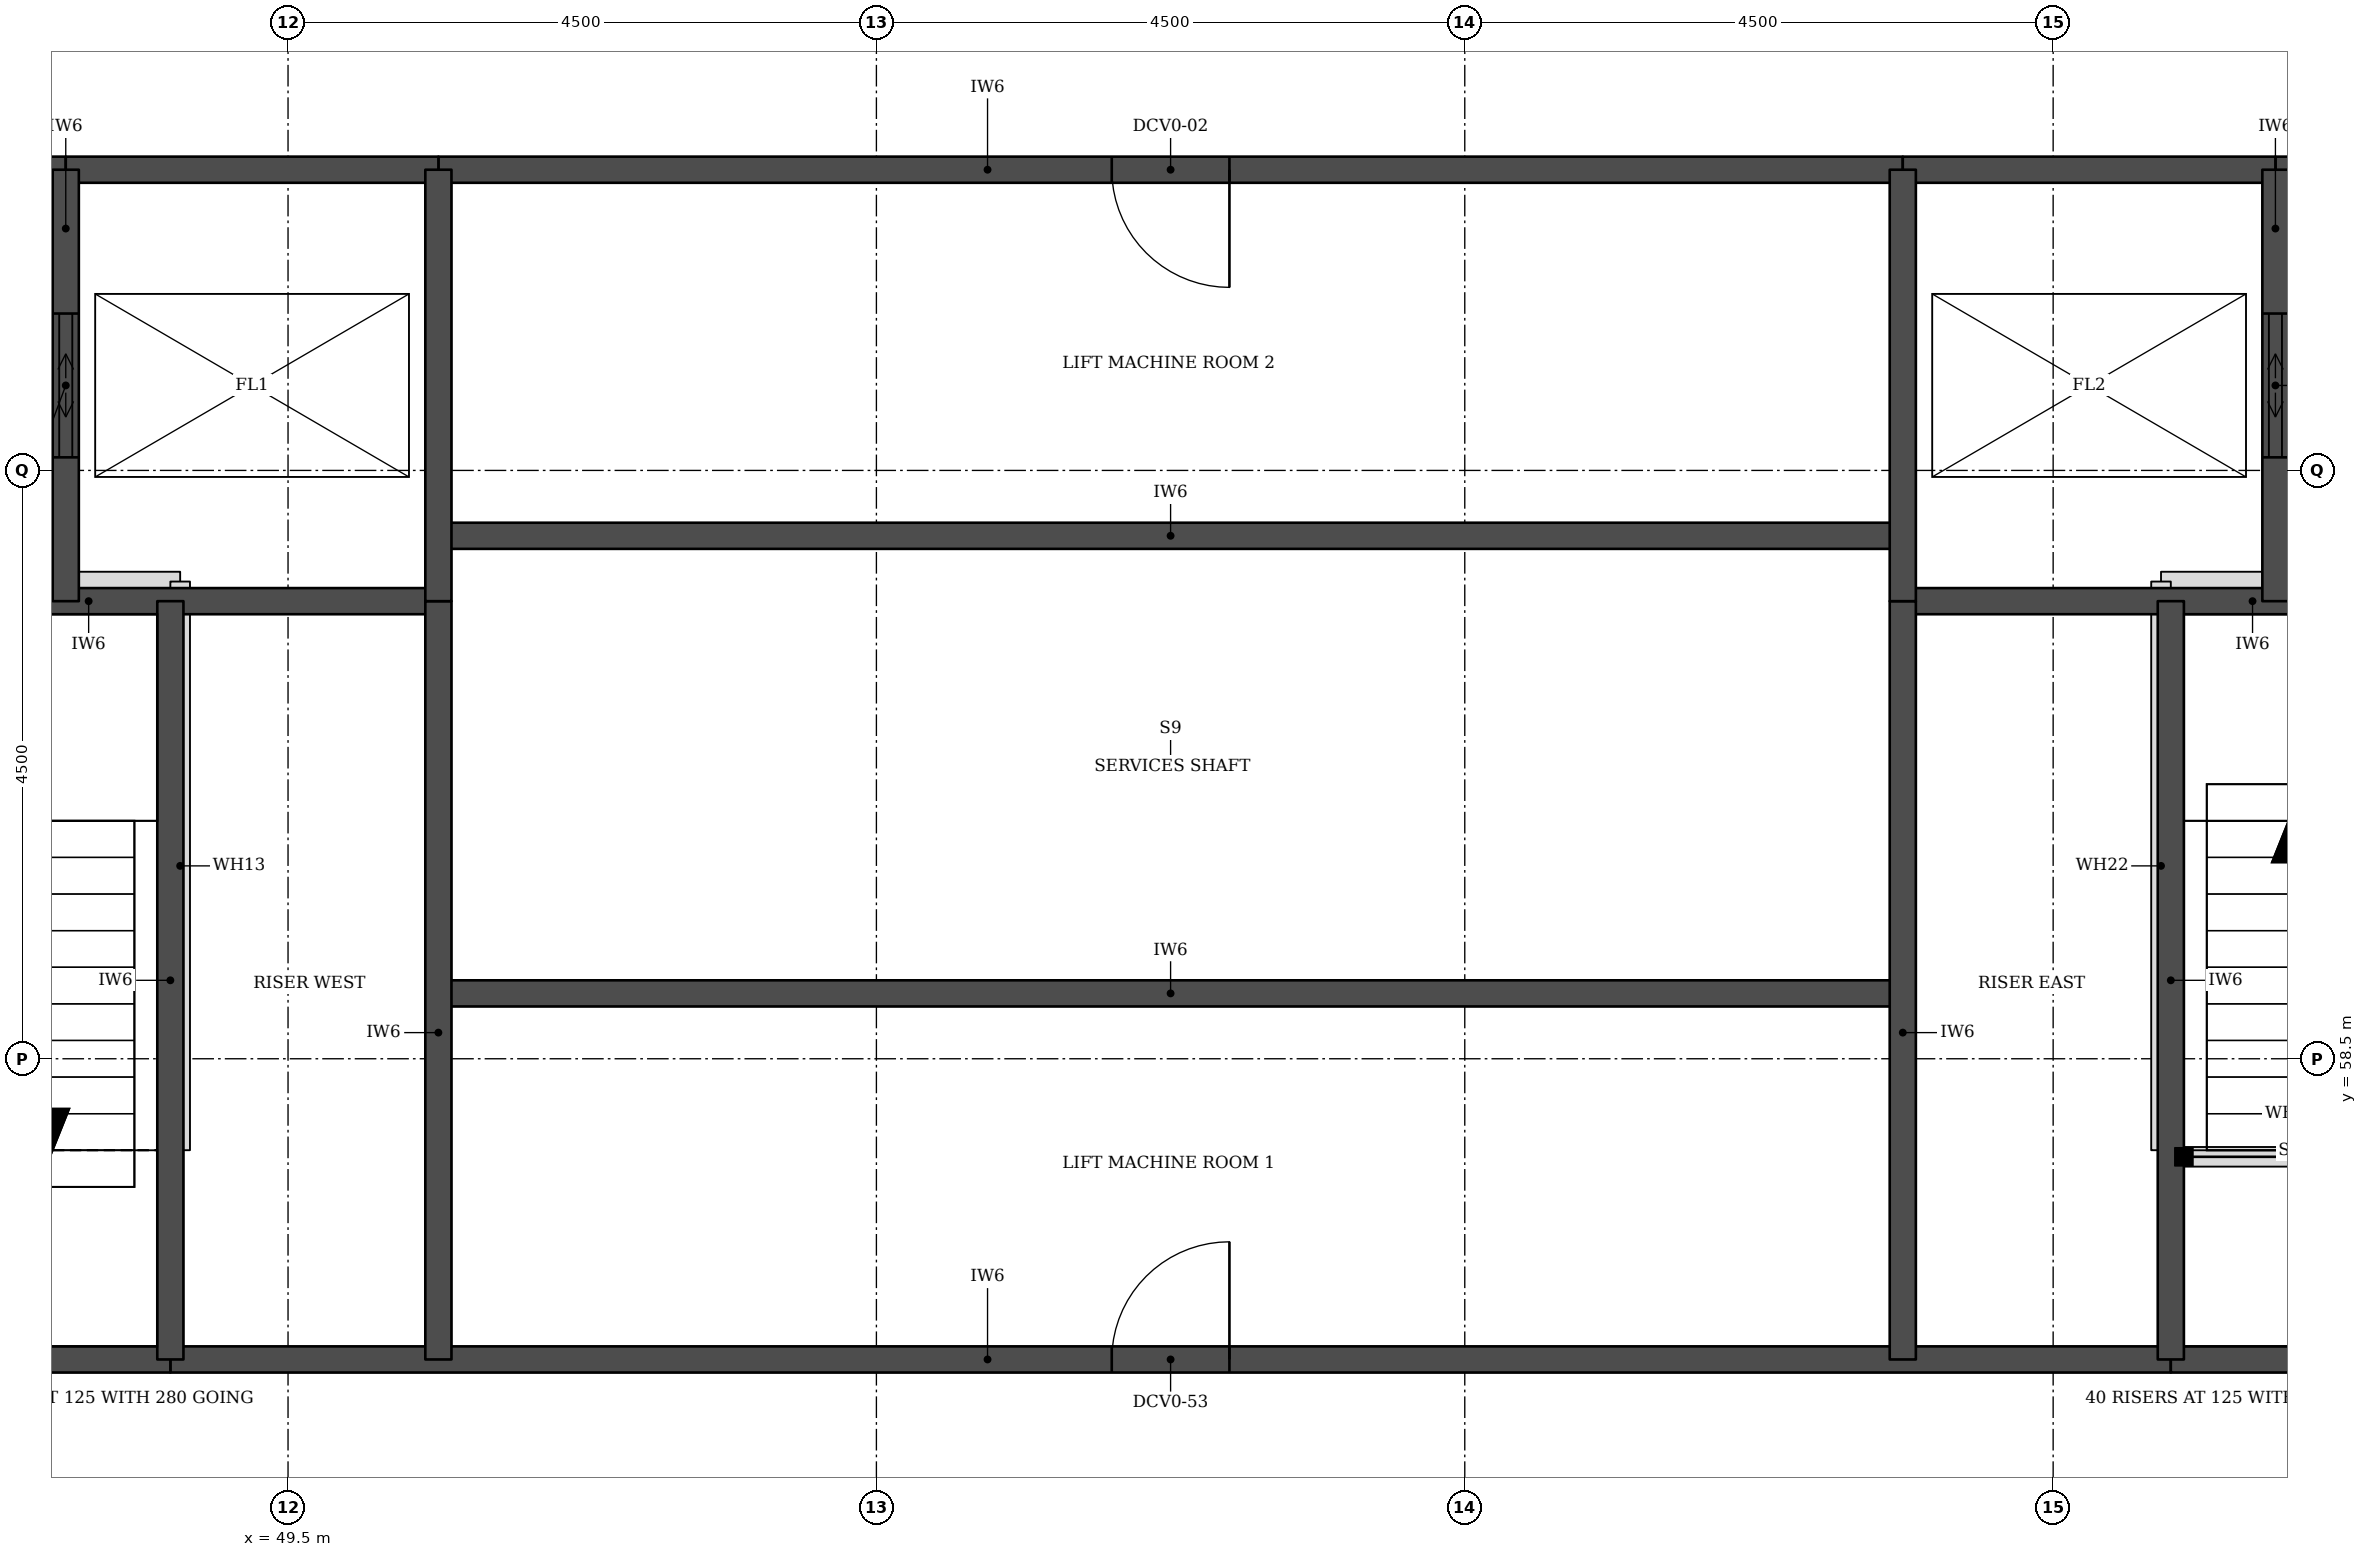
"""IFC4 building model, lengths in metres.
Left out: names, types, materials, properties, quantities, classifications, styles, units other than length and angle.
Written with IfcOpenShell. Run it as: python <this file> out.ifc"""

import sys

from ifc_helpers import new_model, si_unit, direction, frame, frame_2d, origin, place, context, subcontext, project, spatial, rectangle, extrude, element, fill, save


model = new_model("IFC4")
c1 = context("Model", 3, precision=1e-05, world=origin(), true_north=direction((0.0, 1.0)))
c2 = subcontext(c1, "Body", "Model", "MODEL_VIEW")
j1 = project(units=[si_unit("LENGTHUNIT", "METRE"), si_unit("PLANEANGLEUNIT", "RADIAN")], contexts=[c1])
p1 = place(None, origin())
s1 = spatial("IfcSite", under=j1, at=p1, CompositionType="ELEMENT")
p2 = place(p1, origin())
s2 = spatial("IfcBuilding", under=s1, at=p2, CompositionType="ELEMENT")
p3 = place(p2, frame((0.0, 0.0, 268.7)))
s3 = spatial("IfcBuildingStorey", under=s2, at=p3, CompositionType="ELEMENT", Elevation=268.7)
p4 = place(p3, frame((48.6, 56.2, 0.0), z_axis=(0.0, 0.0, 1.0), x_axis=(1.0, 0.0, 0.0)))
e1 = element("IfcWall", 1, at=p4, inside=s3, PredefinedType="SOLIDWALL", context=c2, shape_type="SweptSolid", body=[
    extrude(rectangle(XDim=15.3, YDim=0.2, at=frame_2d((7.65, 0.0))), origin(), (0.0, 0.0, 1.0), 4.75),
])
p5 = place(p4, frame((7.2, 0.0, 0.0)))
e2 = element("IfcOpeningElement", 2, at=p5, cuts=e1, PredefinedType="OPENING", context=c2, shape_type="SweptSolid", body=[
    extrude(rectangle(XDim=0.9, YDim=2.1, at=frame_2d((0.45, 1.05))), frame((0.0, 0.11, 0.0), z_axis=(0.0, -1.0, 0.0), x_axis=(1.0, 0.0, 0.0)), (0.0, 0.0, 1.0), 0.22),
])
for number, where, z_axis, x_axis in (
    (3, (45.3, 56.2, 0.0), (0.0, 0.0, 1.0), (1.0, 0.0, 0.0)),
    (4, (63.9, 56.2, 0.0), (0.0, 0.0, 1.0), (1.0, 0.0, 0.0)),
):
    element("IfcWall", number, at=place(p3, frame(where, z_axis=z_axis, x_axis=x_axis)), inside=s3, PredefinedType="SOLIDWALL", context=c2, shape_type="SweptSolid", body=[
        extrude(rectangle(XDim=3.3, YDim=0.2, at=frame_2d((1.65, 0.0))), origin(), (0.0, 0.0, 1.0), 4.75),
    ])
p6 = place(p3, frame((50.65, 59.0, 0.0), z_axis=(0.0, 0.0, 1.0), x_axis=(1.0, 0.0, 0.0)))
e5 = element("IfcWall", 5, at=p6, inside=s3, PredefinedType="SOLIDWALL", context=c2, shape_type="SweptSolid", body=[
    extrude(rectangle(XDim=11.2, YDim=0.2, at=frame_2d((5.6, 0.0))), origin(), (0.0, 0.0, 1.0), 4.75),
])
for number, where, z_axis, x_axis in (
    (6, (45.3, 62.0, 0.0), (0.0, 0.0, 1.0), (1.0, 0.0, 0.0)),
    (7, (61.85, 62.0, 0.0), (0.0, 0.0, 1.0), (1.0, 0.0, 0.0)),
):
    element("IfcWall", number, at=place(p3, frame(where, z_axis=z_axis, x_axis=x_axis)), inside=s3, PredefinedType="SOLIDWALL", context=c2, shape_type="SweptSolid", body=[
        extrude(rectangle(XDim=5.35, YDim=0.2, at=frame_2d((2.675, 0.0))), origin(), (0.0, 0.0, 1.0), 4.75),
    ])
p7 = place(p3, frame((50.65, 62.5, 0.0), z_axis=(0.0, 0.0, 1.0), x_axis=(1.0, 0.0, 0.0)))
e8 = element("IfcWall", 8, at=p7, inside=s3, PredefinedType="SOLIDWALL", context=c2, shape_type="SweptSolid", body=[
    extrude(rectangle(XDim=11.2, YDim=0.2, at=frame_2d((5.6, 0.0))), origin(), (0.0, 0.0, 1.0), 4.75),
])
for number, where, z_axis, x_axis in (
    (9, (45.3, 65.3, 0.0), (0.0, 0.0, 1.0), (1.0, 0.0, 0.0)),
    (10, (64.7, 65.3, 0.0), (0.0, 0.0, 1.0), (1.0, 0.0, 0.0)),
):
    element("IfcWall", number, at=place(p3, frame(where, z_axis=z_axis, x_axis=x_axis)), inside=s3, PredefinedType="SOLIDWALL", context=c2, shape_type="SweptSolid", body=[
        extrude(rectangle(XDim=2.5, YDim=0.2, at=frame_2d((1.25, 0.0))), origin(), (0.0, 0.0, 1.0), 4.75),
    ])
p8 = place(p3, frame((50.65, 65.3, 0.0), z_axis=(0.0, 0.0, 1.0), x_axis=(1.0, 0.0, 0.0)))
e11 = element("IfcWall", 11, at=p8, inside=s3, PredefinedType="SOLIDWALL", context=c2, shape_type="SweptSolid", body=[
    extrude(rectangle(XDim=11.2, YDim=0.2, at=frame_2d((5.6, 0.0))), origin(), (0.0, 0.0, 1.0), 4.75),
])
p9 = place(p8, frame((5.15, 0.0, 0.0)))
e12 = element("IfcOpeningElement", 12, at=p9, cuts=e11, PredefinedType="OPENING", context=c2, shape_type="SweptSolid", body=[
    extrude(rectangle(XDim=0.9, YDim=2.1, at=frame_2d((0.45, 1.05))), frame((0.0, 0.11, 0.0), z_axis=(0.0, -1.0, 0.0), x_axis=(1.0, 0.0, 0.0)), (0.0, 0.0, 1.0), 0.22),
])
for number, where, z_axis, x_axis in (
    (13, (47.8, 65.3, 0.0), (0.0, 0.0, 1.0), (1.0, 0.0, 0.0)),
    (14, (61.85, 65.3, 0.0), (0.0, 0.0, 1.0), (1.0, 0.0, 0.0)),
):
    element("IfcWall", number, at=place(p3, frame(where, z_axis=z_axis, x_axis=x_axis)), inside=s3, PredefinedType="SOLIDWALL", context=c2, shape_type="SweptSolid", body=[
        extrude(rectangle(XDim=2.85, YDim=0.2, at=frame_2d((1.425, 0.0))), origin(), (0.0, 0.0, 1.0), 4.75),
    ])
p10 = place(p3, frame((47.8, 62.0, 0.0), z_axis=(0.0, 0.0, 1.0), x_axis=(0.0, 1.0, 0.0)))
e15 = element("IfcWall", 15, at=p10, inside=s3, PredefinedType="SOLIDWALL", context=c2, shape_type="SweptSolid", body=[
    extrude(rectangle(XDim=3.3, YDim=0.2, at=frame_2d((1.65, 0.0))), origin(), (0.0, 0.0, 1.0), 4.75),
])
p11 = place(p10, frame((1.1, 0.0, 0.0)))
e16 = element("IfcOpeningElement", 16, at=p11, cuts=e15, PredefinedType="OPENING", context=c2, shape_type="SweptSolid", body=[
    extrude(rectangle(XDim=1.1, YDim=2.1, at=frame_2d((0.55, 1.05))), frame((0.0, 0.11, 0.0), z_axis=(0.0, -1.0, 0.0), x_axis=(1.0, 0.0, 0.0)), (0.0, 0.0, 1.0), 0.22),
])
for number, where, z_axis, x_axis in (
    (17, (48.6, 56.2, 0.0), (0.0, 0.0, 1.0), (0.0, 1.0, 0.0)),
    (18, (50.65, 56.2, 0.0), (0.0, 0.0, 1.0), (0.0, 1.0, 0.0)),
):
    element("IfcWall", number, at=place(p3, frame(where, z_axis=z_axis, x_axis=x_axis)), inside=s3, PredefinedType="SOLIDWALL", context=c2, shape_type="SweptSolid", body=[
        extrude(rectangle(XDim=5.8, YDim=0.2, at=frame_2d((2.9, 0.0))), origin(), (0.0, 0.0, 1.0), 4.75),
    ])
p12 = place(p3, frame((50.65, 62.0, 0.0), z_axis=(0.0, 0.0, 1.0), x_axis=(0.0, 1.0, 0.0)))
e19 = element("IfcWall", 19, at=p12, inside=s3, PredefinedType="SOLIDWALL", context=c2, shape_type="SweptSolid", body=[
    extrude(rectangle(XDim=3.3, YDim=0.2, at=frame_2d((1.65, 0.0))), origin(), (0.0, 0.0, 1.0), 4.75),
])
p13 = place(p3, frame((61.85, 56.2, 0.0), z_axis=(0.0, 0.0, 1.0), x_axis=(0.0, 1.0, 0.0)))
e20 = element("IfcWall", 20, at=p13, inside=s3, PredefinedType="SOLIDWALL", context=c2, shape_type="SweptSolid", body=[
    extrude(rectangle(XDim=5.8, YDim=0.2, at=frame_2d((2.9, 0.0))), origin(), (0.0, 0.0, 1.0), 4.75),
])
p14 = place(p3, frame((61.85, 62.0, 0.0), z_axis=(0.0, 0.0, 1.0), x_axis=(0.0, 1.0, 0.0)))
e21 = element("IfcWall", 21, at=p14, inside=s3, PredefinedType="SOLIDWALL", context=c2, shape_type="SweptSolid", body=[
    extrude(rectangle(XDim=3.3, YDim=0.2, at=frame_2d((1.65, 0.0))), origin(), (0.0, 0.0, 1.0), 4.75),
])
p15 = place(p3, frame((63.9, 56.2, 0.0), z_axis=(0.0, 0.0, 1.0), x_axis=(0.0, 1.0, 0.0)))
e22 = element("IfcWall", 22, at=p15, inside=s3, PredefinedType="SOLIDWALL", context=c2, shape_type="SweptSolid", body=[
    extrude(rectangle(XDim=5.8, YDim=0.2, at=frame_2d((2.9, 0.0))), origin(), (0.0, 0.0, 1.0), 4.75),
])
p16 = place(p3, frame((64.7, 62.0, 0.0), z_axis=(0.0, 0.0, 1.0), x_axis=(0.0, 1.0, 0.0)))
e23 = element("IfcWall", 23, at=p16, inside=s3, PredefinedType="SOLIDWALL", context=c2, shape_type="SweptSolid", body=[
    extrude(rectangle(XDim=3.3, YDim=0.2, at=frame_2d((1.65, 0.0))), origin(), (0.0, 0.0, 1.0), 4.75),
])
p17 = place(p16, frame((1.1, 0.0, 0.0)))
e24 = element("IfcOpeningElement", 24, at=p17, cuts=e23, PredefinedType="OPENING", context=c2, shape_type="SweptSolid", body=[
    extrude(rectangle(XDim=1.1, YDim=2.1, at=frame_2d((0.55, 1.05))), frame((0.0, 0.11, 0.0), z_axis=(0.0, -1.0, 0.0), x_axis=(1.0, 0.0, 0.0)), (0.0, 0.0, 1.0), 0.22),
])
p18 = place(p11, origin())
e25 = element("IfcDoor", 25, at=p18, inside=s3, OperationType="DOUBLE_DOOR_SLIDING", PredefinedType="DOOR", context=c2, shape_type="SweptSolid", body=[
    extrude(rectangle(XDim=1.1, YDim=2.1, at=frame_2d((0.55, 1.05))), frame((0.0, 0.025, 0.0), z_axis=(0.0, -1.0, 0.0), x_axis=(1.0, 0.0, 0.0)), (0.0, 0.0, 1.0), 0.05),
])
fill(e16, e25)
p19 = place(p17, origin())
e26 = element("IfcDoor", 26, at=p19, inside=s3, OperationType="DOUBLE_DOOR_SLIDING", PredefinedType="DOOR", context=c2, shape_type="SweptSolid", body=[
    extrude(rectangle(XDim=1.1, YDim=2.1, at=frame_2d((0.55, 1.05))), frame((0.0, 0.025, 0.0), z_axis=(0.0, -1.0, 0.0), x_axis=(1.0, 0.0, 0.0)), (0.0, 0.0, 1.0), 0.05),
])
fill(e24, e26)
p20 = place(p5, origin())
e27 = element("IfcDoor", 27, at=p20, inside=s3, OperationType="SINGLE_SWING_RIGHT", PredefinedType="DOOR", context=c2, shape_type="SweptSolid", body=[
    extrude(rectangle(XDim=0.9, YDim=2.1, at=frame_2d((0.45, 1.05))), frame((0.0, 0.025, 0.0), z_axis=(0.0, -1.0, 0.0), x_axis=(1.0, 0.0, 0.0)), (0.0, 0.0, 1.0), 0.05),
])
fill(e2, e27)
p21 = place(p9, frame((0.9, 0.0, 0.0), z_axis=(0.0, 0.0, 1.0), x_axis=(-1.0, 0.0, 0.0)))
e28 = element("IfcDoor", 28, at=p21, inside=s3, OperationType="SINGLE_SWING_LEFT", PredefinedType="DOOR", context=c2, shape_type="SweptSolid", body=[
    extrude(rectangle(XDim=0.9, YDim=2.1, at=frame_2d((0.45, 1.05))), frame((0.0, 0.025, 0.0), z_axis=(0.0, -1.0, 0.0), x_axis=(1.0, 0.0, 0.0)), (0.0, 0.0, 1.0), 0.05),
])
fill(e12, e28)
save(model, sys.argv[1])
